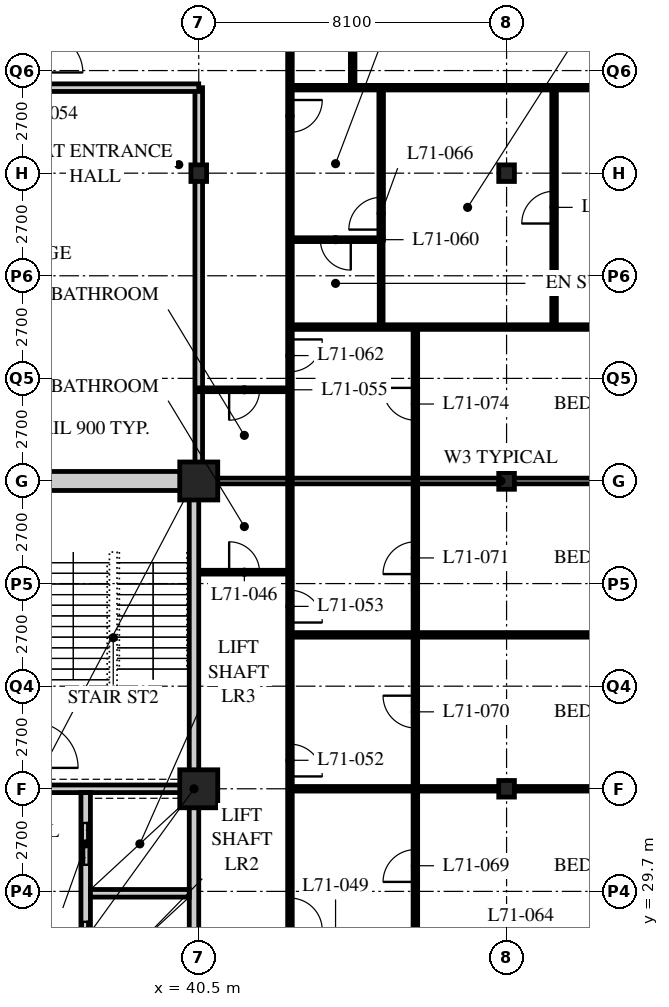
"""IFC4 building model, lengths in metres.
Left out: names, types, materials, properties, quantities, classifications, styles, units other than length and angle.
Written with IfcOpenShell. Run it as: python <this file> out.ifc"""

import sys

from ifc_helpers import new_model, si_unit, direction, frame, frame_2d, origin, origin_2d, place, context, subcontext, project, spatial, rectangle, hollow_rectangle, i_section, extrude, element, fill, save


model = new_model("IFC4")
c1 = context("Model", 3, precision=1e-05, world=origin(), true_north=direction((0.0, 1.0)))
c2 = subcontext(c1, "Body", "Model", "MODEL_VIEW")
j1 = project(units=[si_unit("LENGTHUNIT", "METRE"), si_unit("PLANEANGLEUNIT", "RADIAN")], contexts=[c1])
p1 = place(None, origin())
s1 = spatial("IfcSite", under=j1, at=p1, CompositionType="ELEMENT")
p2 = place(p1, origin())
s2 = spatial("IfcBuilding", under=s1, at=p2, CompositionType="ELEMENT")
p3 = place(p2, frame((0.0, 0.0, 277.5)))
s3 = spatial("IfcBuildingStorey", under=s2, at=p3, CompositionType="ELEMENT", Elevation=277.5)
for number, where, z_axis, x_axis in (
    (1, (40.5, 32.4, 0.0), (0.0, 0.0, 1.0), (1.0, 0.0, 0.0)),
    (2, (40.5, 40.5, 0.0), (0.0, 0.0, 1.0), (1.0, 0.0, 0.0)),
):
    element("IfcColumn", number, at=place(p3, frame(where, z_axis=z_axis, x_axis=x_axis)), inside=s3, PredefinedType="COLUMN", context=c2, shape_type="SweptSolid", body=[
        extrude(hollow_rectangle(XDim=1.0, YDim=1.0, WallThickness=0.1, at=origin_2d()), origin(), (0.0, 0.0, 1.0), 3.9),
    ])
for number, where, z_axis, x_axis in (
    (3, (40.5, 48.6, 0.0), (0.0, 0.0, 1.0), (1.0, 0.0, 0.0)),
    (4, (48.6, 32.4, 0.0), (0.0, 0.0, 1.0), (1.0, 0.0, 0.0)),
    (5, (48.6, 40.5, 0.0), (0.0, 0.0, 1.0), (1.0, 0.0, 0.0)),
    (6, (48.6, 48.6, 0.0), (0.0, 0.0, 1.0), (1.0, 0.0, 0.0)),
):
    element("IfcColumn", number, at=place(p3, frame(where, z_axis=z_axis, x_axis=x_axis)), inside=s3, PredefinedType="COLUMN", context=c2, shape_type="SweptSolid", body=[
        extrude(i_section(OverallWidth=0.412, OverallDepth=0.437, WebThickness=0.036, FlangeThickness=0.058, FilletRadius=0.015, at=origin_2d()), origin(), (0.0, 0.0, 1.0), 3.9),
    ])
p4 = place(p3, frame((40.5, 40.5, 0.0), z_axis=(0.0, 0.0, 1.0), x_axis=(0.0, 1.0, 0.0)))
e7 = element("IfcWall", 7, at=p4, inside=s3, PredefinedType="SOLIDWALL", context=c2, shape_type="SweptSolid", body=[
    extrude(rectangle(XDim=10.35, YDim=0.2, at=frame_2d((5.175, 0.0))), origin(), (0.0, 0.0, 1.0), 3.078),
])
p5 = place(p3, frame((40.5, 38.1, 0.0), z_axis=(0.0, 0.0, 1.0), x_axis=(1.0, 0.0, 0.0)))
e8 = element("IfcWall", 8, at=p5, inside=s3, PredefinedType="PARTITIONING", context=c2, shape_type="SweptSolid", body=[
    extrude(rectangle(XDim=2.4, YDim=0.1, at=frame_2d((1.2, 0.0))), origin(), (0.0, 0.0, 1.0), 3.69),
])
p6 = place(p5, frame((0.8, 0.0, 0.0)))
e9 = element("IfcOpeningElement", 9, at=p6, cuts=e8, PredefinedType="OPENING", context=c2, shape_type="SweptSolid", body=[
    extrude(rectangle(XDim=0.8, YDim=2.1, at=frame_2d((0.4, 1.05))), frame((0.0, 0.06, 0.0), z_axis=(0.0, -1.0, 0.0), x_axis=(1.0, 0.0, 0.0)), (0.0, 0.0, 1.0), 0.12),
])
p7 = place(p3, frame((42.9, 22.5, 0.0), z_axis=(0.0, 0.0, 1.0), x_axis=(0.0, 1.0, 0.0)))
e10 = element("IfcWall", 10, at=p7, inside=s3, PredefinedType="PARTITIONING", context=c2, shape_type="SweptSolid", body=[
    extrude(rectangle(XDim=18.0, YDim=0.12, at=frame_2d((9.0, 0.0))), origin(), (0.0, 0.0, 1.0), 3.69),
])
p8 = place(p7, frame((2.125, 0.0, 0.0)))
e11 = element("IfcOpeningElement", 11, at=p8, cuts=e10, PredefinedType="OPENING", context=c2, shape_type="SweptSolid", body=[
    extrude(rectangle(XDim=0.85, YDim=2.1, at=frame_2d((0.425, 1.05))), frame((0.0, 0.07, 0.0), z_axis=(0.0, -1.0, 0.0), x_axis=(1.0, 0.0, 0.0)), (0.0, 0.0, 1.0), 0.14),
])
p9 = place(p7, frame((6.175, 0.0, 0.0)))
e12 = element("IfcOpeningElement", 12, at=p9, cuts=e10, PredefinedType="OPENING", context=c2, shape_type="SweptSolid", body=[
    extrude(rectangle(XDim=0.85, YDim=2.1, at=frame_2d((0.425, 1.05))), frame((0.0, 0.07, 0.0), z_axis=(0.0, -1.0, 0.0), x_axis=(1.0, 0.0, 0.0)), (0.0, 0.0, 1.0), 0.14),
])
p10 = place(p7, frame((10.225, 0.0, 0.0)))
e13 = element("IfcOpeningElement", 13, at=p10, cuts=e10, PredefinedType="OPENING", context=c2, shape_type="SweptSolid", body=[
    extrude(rectangle(XDim=0.85, YDim=2.1, at=frame_2d((0.425, 1.05))), frame((0.0, 0.07, 0.0), z_axis=(0.0, -1.0, 0.0), x_axis=(1.0, 0.0, 0.0)), (0.0, 0.0, 1.0), 0.14),
])
p11 = place(p7, frame((14.275, 0.0, 0.0)))
e14 = element("IfcOpeningElement", 14, at=p11, cuts=e10, PredefinedType="OPENING", context=c2, shape_type="SweptSolid", body=[
    extrude(rectangle(XDim=0.85, YDim=2.1, at=frame_2d((0.425, 1.05))), frame((0.0, 0.07, 0.0), z_axis=(0.0, -1.0, 0.0), x_axis=(1.0, 0.0, 0.0)), (0.0, 0.0, 1.0), 0.14),
])
p12 = place(p3, frame((40.5, 40.5, 0.0), z_axis=(0.0, 0.0, 1.0), x_axis=(1.0, 0.0, 0.0)))
e15 = element("IfcWall", 15, at=p12, inside=s3, PredefinedType="PARTITIONING", context=c2, shape_type="SweptSolid", body=[
    extrude(rectangle(XDim=15.9, YDim=0.15, at=frame_2d((7.95, 0.0))), origin(), (0.0, 0.0, 1.0), 3.078),
])
p13 = place(p3, frame((42.9, 32.4, 0.0), z_axis=(0.0, 0.0, 1.0), x_axis=(1.0, 0.0, 0.0)))
e16 = element("IfcWall", 16, at=p13, inside=s3, PredefinedType="PARTITIONING", context=c2, shape_type="SweptSolid", body=[
    extrude(rectangle(XDim=13.5, YDim=0.12, at=frame_2d((6.75, 0.0))), origin(), (0.0, 0.0, 1.0), 3.078),
])
p14 = place(p3, frame((42.9, 36.45, 0.0), z_axis=(0.0, 0.0, 1.0), x_axis=(1.0, 0.0, 0.0)))
e17 = element("IfcWall", 17, at=p14, inside=s3, PredefinedType="PARTITIONING", context=c2, shape_type="SweptSolid", body=[
    extrude(rectangle(XDim=13.5, YDim=0.12, at=frame_2d((6.75, 0.0))), origin(), (0.0, 0.0, 1.0), 3.69),
])
p15 = place(p3, frame((40.5, 42.9, 0.0), z_axis=(0.0, 0.0, 1.0), x_axis=(1.0, 0.0, 0.0)))
e18 = element("IfcWall", 18, at=p15, inside=s3, PredefinedType="PARTITIONING", context=c2, shape_type="SweptSolid", body=[
    extrude(rectangle(XDim=2.4, YDim=0.1, at=frame_2d((1.2, 0.0))), origin(), (0.0, 0.0, 1.0), 3.69),
])
p16 = place(p15, frame((0.8, 0.0, 0.0)))
e19 = element("IfcOpeningElement", 19, at=p16, cuts=e18, PredefinedType="OPENING", context=c2, shape_type="SweptSolid", body=[
    extrude(rectangle(XDim=0.8, YDim=2.1, at=frame_2d((0.4, 1.05))), frame((0.0, 0.06, 0.0), z_axis=(0.0, -1.0, 0.0), x_axis=(1.0, 0.0, 0.0)), (0.0, 0.0, 1.0), 0.12),
])
p17 = place(p3, frame((42.9, 52.65, 0.0), z_axis=(0.0, 0.0, 1.0), x_axis=(0.0, -1.0, 0.0)))
e20 = element("IfcWall", 20, at=p17, inside=s3, PredefinedType="PARTITIONING", context=c2, shape_type="SweptSolid", body=[
    extrude(rectangle(XDim=12.15, YDim=0.12, at=frame_2d((6.075, 0.0))), origin(), (0.0, 0.0, 1.0), 3.69),
])
p18 = place(p17, frame((2.125, 0.0, 0.0)))
e21 = element("IfcOpeningElement", 21, at=p18, cuts=e20, PredefinedType="OPENING", context=c2, shape_type="SweptSolid", body=[
    extrude(rectangle(XDim=0.85, YDim=2.1, at=frame_2d((0.425, 1.05))), frame((0.0, 0.07, 0.0), z_axis=(0.0, -1.0, 0.0), x_axis=(1.0, 0.0, 0.0)), (0.0, 0.0, 1.0), 0.14),
])
p19 = place(p17, frame((8.425, 0.0, 0.0)))
e22 = element("IfcOpeningElement", 22, at=p19, cuts=e20, PredefinedType="OPENING", context=c2, shape_type="SweptSolid", body=[
    extrude(rectangle(XDim=0.85, YDim=2.1, at=frame_2d((0.425, 1.05))), frame((0.0, 0.07, 0.0), z_axis=(0.0, -1.0, 0.0), x_axis=(1.0, 0.0, 0.0)), (0.0, 0.0, 1.0), 0.14),
])
p20 = place(p3, frame((36.45, 50.85, 0.0), z_axis=(0.0, 0.0, 1.0), x_axis=(1.0, 0.0, 0.0)))
e23 = element("IfcWall", 23, at=p20, inside=s3, PredefinedType="SOLIDWALL", context=c2, shape_type="SweptSolid", body=[
    extrude(rectangle(XDim=4.05, YDim=0.2, at=frame_2d((2.025, 0.0))), origin(), (0.0, 0.0, 1.0), 3.69),
])
p21 = place(p3, frame((42.9, 50.85, 0.0), z_axis=(0.0, 0.0, 1.0), x_axis=(1.0, 0.0, 0.0)))
e24 = element("IfcWall", 24, at=p21, inside=s3, PredefinedType="PARTITIONING", context=c2, shape_type="SweptSolid", body=[
    extrude(rectangle(XDim=13.5, YDim=0.12, at=frame_2d((6.75, 0.0))), origin(), (0.0, 0.0, 1.0), 3.69),
])
p22 = place(p3, frame((44.55, 64.5, 0.0), z_axis=(0.0, 0.0, 1.0), x_axis=(0.0, -1.0, 0.0)))
e25 = element("IfcWall", 25, at=p22, inside=s3, PredefinedType="PARTITIONING", context=c2, shape_type="SweptSolid", body=[
    extrude(rectangle(XDim=13.65, YDim=0.12, at=frame_2d((6.825, 0.0))), origin(), (0.0, 0.0, 1.0), 3.69),
])
p23 = place(p22, frame((8.425, 0.0, 0.0)))
e26 = element("IfcOpeningElement", 26, at=p23, cuts=e25, PredefinedType="OPENING", context=c2, shape_type="SweptSolid", body=[
    extrude(rectangle(XDim=0.85, YDim=2.1, at=frame_2d((0.425, 1.05))), frame((0.0, 0.07, 0.0), z_axis=(0.0, -1.0, 0.0), x_axis=(1.0, 0.0, 0.0)), (0.0, 0.0, 1.0), 0.14),
])
p24 = place(p22, frame((2.5, 0.0, 0.0)))
e27 = element("IfcOpeningElement", 27, at=p24, cuts=e25, PredefinedType="OPENING", context=c2, shape_type="SweptSolid", body=[
    extrude(rectangle(XDim=0.85, YDim=2.1, at=frame_2d((0.425, 1.05))), frame((0.0, 0.07, 0.0), z_axis=(0.0, -1.0, 0.0), x_axis=(1.0, 0.0, 0.0)), (0.0, 0.0, 1.0), 0.14),
])
p25 = place(p3, frame((42.9, 46.85, 0.0), z_axis=(0.0, 0.0, 1.0), x_axis=(1.0, 0.0, 0.0)))
e28 = element("IfcWall", 28, at=p25, inside=s3, PredefinedType="PARTITIONING", context=c2, shape_type="SweptSolid", body=[
    extrude(rectangle(XDim=2.4, YDim=0.1, at=frame_2d((1.2, 0.0))), origin(), (0.0, 0.0, 1.0), 3.69),
])
p26 = place(p25, frame((0.8, 0.0, 0.0)))
e29 = element("IfcOpeningElement", 29, at=p26, cuts=e28, PredefinedType="OPENING", context=c2, shape_type="SweptSolid", body=[
    extrude(rectangle(XDim=0.8, YDim=2.1, at=frame_2d((0.4, 1.05))), frame((0.0, 0.06, 0.0), z_axis=(0.0, -1.0, 0.0), x_axis=(1.0, 0.0, 0.0)), (0.0, 0.0, 1.0), 0.12),
])
p27 = place(p3, frame((45.3, 46.85, 0.0), z_axis=(0.0, 0.0, 1.0), x_axis=(0.0, -1.0, 0.0)))
e30 = element("IfcWall", 30, at=p27, inside=s3, PredefinedType="PARTITIONING", context=c2, shape_type="SweptSolid", body=[
    extrude(rectangle(XDim=2.3, YDim=0.1, at=frame_2d((1.15, 0.0))), origin(), (0.0, 0.0, 1.0), 3.69),
])
p28 = place(p3, frame((42.9, 44.55, 0.0), z_axis=(0.0, 0.0, 1.0), x_axis=(1.0, 0.0, 0.0)))
e31 = element("IfcWall", 31, at=p28, inside=s3, PredefinedType="PARTITIONING", context=c2, shape_type="SweptSolid", body=[
    extrude(rectangle(XDim=13.5, YDim=0.12, at=frame_2d((6.75, 0.0))), origin(), (0.0, 0.0, 1.0), 3.69),
])
p29 = place(p3, frame((45.3, 50.85, 0.0), z_axis=(0.0, 0.0, 1.0), x_axis=(0.0, -1.0, 0.0)))
e32 = element("IfcWall", 32, at=p29, inside=s3, PredefinedType="PARTITIONING", context=c2, shape_type="SweptSolid", body=[
    extrude(rectangle(XDim=4.01, YDim=0.12, at=frame_2d((2.005, 0.0))), origin(), (0.0, 0.0, 1.0), 3.69),
])
p30 = place(p29, frame((2.885, 0.0, 0.0)))
e33 = element("IfcOpeningElement", 33, at=p30, cuts=e32, PredefinedType="OPENING", context=c2, shape_type="SweptSolid", body=[
    extrude(rectangle(XDim=0.85, YDim=2.1, at=frame_2d((0.425, 1.05))), frame((0.0, 0.07, 0.0), z_axis=(0.0, -1.0, 0.0), x_axis=(1.0, 0.0, 0.0)), (0.0, 0.0, 1.0), 0.14),
])
p31 = place(p3, frame((46.2, 28.35, 0.0), z_axis=(0.0, 0.0, 1.0), x_axis=(0.0, 1.0, 0.0)))
e34 = element("IfcWall", 34, at=p31, inside=s3, PredefinedType="PARTITIONING", context=c2, shape_type="SweptSolid", body=[
    extrude(rectangle(XDim=16.2, YDim=0.12, at=frame_2d((8.1, 0.0))), origin(), (0.0, 0.0, 1.0), 3.69),
])
p32 = place(p31, frame((1.6, 0.0, 0.0)))
e35 = element("IfcOpeningElement", 35, at=p32, cuts=e34, PredefinedType="OPENING", context=c2, shape_type="SweptSolid", body=[
    extrude(rectangle(XDim=0.85, YDim=2.1, at=frame_2d((0.425, 1.05))), frame((0.0, 0.07, 0.0), z_axis=(0.0, -1.0, 0.0), x_axis=(1.0, 0.0, 0.0)), (0.0, 0.0, 1.0), 0.14),
])
p33 = place(p31, frame((5.65, 0.0, 0.0)))
e36 = element("IfcOpeningElement", 36, at=p33, cuts=e34, PredefinedType="OPENING", context=c2, shape_type="SweptSolid", body=[
    extrude(rectangle(XDim=0.85, YDim=2.1, at=frame_2d((0.425, 1.05))), frame((0.0, 0.07, 0.0), z_axis=(0.0, -1.0, 0.0), x_axis=(1.0, 0.0, 0.0)), (0.0, 0.0, 1.0), 0.14),
])
p34 = place(p31, frame((9.7, 0.0, 0.0)))
e37 = element("IfcOpeningElement", 37, at=p34, cuts=e34, PredefinedType="OPENING", context=c2, shape_type="SweptSolid", body=[
    extrude(rectangle(XDim=0.85, YDim=2.1, at=frame_2d((0.425, 1.05))), frame((0.0, 0.07, 0.0), z_axis=(0.0, -1.0, 0.0), x_axis=(1.0, 0.0, 0.0)), (0.0, 0.0, 1.0), 0.14),
])
p35 = place(p31, frame((13.75, 0.0, 0.0)))
e38 = element("IfcOpeningElement", 38, at=p35, cuts=e34, PredefinedType="OPENING", context=c2, shape_type="SweptSolid", body=[
    extrude(rectangle(XDim=0.85, YDim=2.1, at=frame_2d((0.425, 1.05))), frame((0.0, 0.07, 0.0), z_axis=(0.0, -1.0, 0.0), x_axis=(1.0, 0.0, 0.0)), (0.0, 0.0, 1.0), 0.14),
])
p36 = place(p3, frame((49.85, 44.55, 0.0), z_axis=(0.0, 0.0, 1.0), x_axis=(0.0, 1.0, 0.0)))
e39 = element("IfcWall", 39, at=p36, inside=s3, PredefinedType="PARTITIONING", context=c2, shape_type="SweptSolid", body=[
    extrude(rectangle(XDim=6.3, YDim=0.12, at=frame_2d((3.15, 0.0))), origin(), (0.0, 0.0, 1.0), 3.69),
])
p37 = place(p36, frame((2.725, 0.0, 0.0)))
e40 = element("IfcOpeningElement", 40, at=p37, cuts=e39, PredefinedType="OPENING", context=c2, shape_type="SweptSolid", body=[
    extrude(rectangle(XDim=0.85, YDim=2.1, at=frame_2d((0.425, 1.05))), frame((0.0, 0.07, 0.0), z_axis=(0.0, -1.0, 0.0), x_axis=(1.0, 0.0, 0.0)), (0.0, 0.0, 1.0), 0.14),
])
p38 = place(p3, frame((15.95, 40.5, 0.0), z_axis=(0.0, 0.0, 1.0), x_axis=(1.0, 0.0, 0.0)))
e41 = element("IfcWall", 41, at=p38, inside=s3, PredefinedType="SOLIDWALL", context=c2, shape_type="SweptSolid", body=[
    extrude(rectangle(XDim=24.55, YDim=0.5, at=frame_2d((12.275, 0.0))), origin(), (0.0, 0.0, 1.0), 3.04),
])
p39 = place(p38, frame((11.5, 0.0, 0.0)))
e42 = element("IfcOpeningElement", 42, at=p39, cuts=e41, PredefinedType="OPENING", context=c2, shape_type="SweptSolid", body=[
    extrude(rectangle(XDim=1.8, YDim=2.4, at=frame_2d((0.9, 1.2))), frame((0.0, 0.26, 0.0), z_axis=(0.0, -1.0, 0.0), x_axis=(1.0, 0.0, 0.0)), (0.0, 0.0, 1.0), 0.52),
])
p40 = place(p3, frame((40.375, 24.55, 0.0), z_axis=(0.0, 0.0, 1.0), x_axis=(0.0, 1.0, 0.0)))
e43 = element("IfcWall", 43, at=p40, inside=s3, PredefinedType="SOLIDWALL", context=c2, shape_type="SweptSolid", body=[
    extrude(rectangle(XDim=15.7, YDim=0.25, at=frame_2d((7.85, 0.0))), origin(), (0.0, 0.0, 1.0), 3.078),
])
p41 = place(p3, frame((32.3, 32.4, 0.0), z_axis=(0.0, 0.0, 1.0), x_axis=(1.0, 0.0, 0.0)))
e44 = element("IfcWall", 44, at=p41, inside=s3, PredefinedType="SOLIDWALL", context=c2, shape_type="SweptSolid", body=[
    extrude(rectangle(XDim=7.95, YDim=0.2, at=frame_2d((3.975, 0.0))), origin(), (0.0, 0.0, 1.0), 3.078),
])
p42 = place(p3, frame((37.525, 24.55, 0.0), z_axis=(0.0, 0.0, 1.0), x_axis=(0.0, 1.0, 0.0)))
e45 = element("IfcWall", 45, at=p42, inside=s3, PredefinedType="SOLIDWALL", context=c2, shape_type="SweptSolid", body=[
    extrude(rectangle(XDim=7.75, YDim=0.25, at=frame_2d((3.875, 0.0))), origin(), (0.0, 0.0, 1.0), 3.69),
])
p43 = place(p42, frame((0.65, 0.0, 0.0)))
e46 = element("IfcOpeningElement", 46, at=p43, cuts=e45, PredefinedType="OPENING", context=c2, shape_type="SweptSolid", body=[
    extrude(rectangle(XDim=1.1, YDim=2.4, at=frame_2d((0.55, 1.2))), frame((0.0, 0.135, 0.0), z_axis=(0.0, -1.0, 0.0), x_axis=(1.0, 0.0, 0.0)), (0.0, 0.0, 1.0), 0.27),
])
p44 = place(p42, frame((3.25, 0.0, 0.0)))
e47 = element("IfcOpeningElement", 47, at=p44, cuts=e45, PredefinedType="OPENING", context=c2, shape_type="SweptSolid", body=[
    extrude(rectangle(XDim=1.1, YDim=2.4, at=frame_2d((0.55, 1.2))), frame((0.0, 0.135, 0.0), z_axis=(0.0, -1.0, 0.0), x_axis=(1.0, 0.0, 0.0)), (0.0, 0.0, 1.0), 0.27),
])
p45 = place(p42, frame((5.85, 0.0, 0.0)))
e48 = element("IfcOpeningElement", 48, at=p45, cuts=e45, PredefinedType="OPENING", context=c2, shape_type="SweptSolid", body=[
    extrude(rectangle(XDim=1.1, YDim=2.4, at=frame_2d((0.55, 1.2))), frame((0.0, 0.135, 0.0), z_axis=(0.0, -1.0, 0.0), x_axis=(1.0, 0.0, 0.0)), (0.0, 0.0, 1.0), 0.27),
])
p46 = place(p3, frame((37.65, 29.65, 0.0), z_axis=(0.0, 0.0, 1.0), x_axis=(1.0, 0.0, 0.0)))
e49 = element("IfcWall", 49, at=p46, inside=s3, PredefinedType="SOLIDWALL", context=c2, shape_type="SweptSolid", body=[
    extrude(rectangle(XDim=2.6, YDim=0.2, at=frame_2d((1.3, 0.0))), origin(), (0.0, 0.0, 1.0), 3.69),
])
p47 = place(p6, origin())
e50 = element("IfcDoor", 50, at=p47, inside=s3, OperationType="SINGLE_SWING_LEFT", PredefinedType="DOOR", context=c2, shape_type="SweptSolid", body=[
    extrude(rectangle(XDim=0.8, YDim=2.1, at=frame_2d((0.4, 1.05))), frame((0.0, 0.025, 0.0), z_axis=(0.0, -1.0, 0.0), x_axis=(1.0, 0.0, 0.0)), (0.0, 0.0, 1.0), 0.05),
])
fill(e9, e50)
p48 = place(p9, origin())
e51 = element("IfcDoor", 51, at=p48, inside=s3, OperationType="SINGLE_SWING_RIGHT", PredefinedType="DOOR", context=c2, shape_type="SweptSolid", body=[
    extrude(rectangle(XDim=0.85, YDim=2.1, at=frame_2d((0.425, 1.05))), frame((0.0, 0.025, 0.0), z_axis=(0.0, -1.0, 0.0), x_axis=(1.0, 0.0, 0.0)), (0.0, 0.0, 1.0), 0.05),
])
fill(e12, e51)
p49 = place(p10, origin())
e52 = element("IfcDoor", 52, at=p49, inside=s3, OperationType="SINGLE_SWING_RIGHT", PredefinedType="DOOR", context=c2, shape_type="SweptSolid", body=[
    extrude(rectangle(XDim=0.85, YDim=2.1, at=frame_2d((0.425, 1.05))), frame((0.0, 0.025, 0.0), z_axis=(0.0, -1.0, 0.0), x_axis=(1.0, 0.0, 0.0)), (0.0, 0.0, 1.0), 0.05),
])
fill(e13, e52)
p50 = place(p11, origin())
e53 = element("IfcDoor", 53, at=p50, inside=s3, OperationType="SINGLE_SWING_RIGHT", PredefinedType="DOOR", context=c2, shape_type="SweptSolid", body=[
    extrude(rectangle(XDim=0.85, YDim=2.1, at=frame_2d((0.425, 1.05))), frame((0.0, 0.025, 0.0), z_axis=(0.0, -1.0, 0.0), x_axis=(1.0, 0.0, 0.0)), (0.0, 0.0, 1.0), 0.05),
])
fill(e14, e53)
p51 = place(p16, origin())
e54 = element("IfcDoor", 54, at=p51, inside=s3, OperationType="SINGLE_SWING_RIGHT", PredefinedType="DOOR", context=c2, shape_type="SweptSolid", body=[
    extrude(rectangle(XDim=0.8, YDim=2.1, at=frame_2d((0.4, 1.05))), frame((0.0, 0.025, 0.0), z_axis=(0.0, -1.0, 0.0), x_axis=(1.0, 0.0, 0.0)), (0.0, 0.0, 1.0), 0.05),
])
fill(e19, e54)
p52 = place(p26, origin())
e55 = element("IfcDoor", 55, at=p52, inside=s3, OperationType="SINGLE_SWING_LEFT", PredefinedType="DOOR", context=c2, shape_type="SweptSolid", body=[
    extrude(rectangle(XDim=0.8, YDim=2.1, at=frame_2d((0.4, 1.05))), frame((0.0, 0.025, 0.0), z_axis=(0.0, -1.0, 0.0), x_axis=(1.0, 0.0, 0.0)), (0.0, 0.0, 1.0), 0.05),
])
fill(e29, e55)
p53 = place(p18, origin())
e56 = element("IfcDoor", 56, at=p53, inside=s3, OperationType="SINGLE_SWING_LEFT", PredefinedType="DOOR", context=c2, shape_type="SweptSolid", body=[
    extrude(rectangle(XDim=0.85, YDim=2.1, at=frame_2d((0.425, 1.05))), frame((0.0, 0.025, 0.0), z_axis=(0.0, -1.0, 0.0), x_axis=(1.0, 0.0, 0.0)), (0.0, 0.0, 1.0), 0.05),
])
fill(e21, e56)
p54 = place(p19, origin())
e57 = element("IfcDoor", 57, at=p54, inside=s3, OperationType="SINGLE_SWING_LEFT", PredefinedType="DOOR", context=c2, shape_type="SweptSolid", body=[
    extrude(rectangle(XDim=0.85, YDim=2.1, at=frame_2d((0.425, 1.05))), frame((0.0, 0.025, 0.0), z_axis=(0.0, -1.0, 0.0), x_axis=(1.0, 0.0, 0.0)), (0.0, 0.0, 1.0), 0.05),
])
fill(e22, e57)
p55 = place(p30, origin())
e58 = element("IfcDoor", 58, at=p55, inside=s3, OperationType="SINGLE_SWING_LEFT", PredefinedType="DOOR", context=c2, shape_type="SweptSolid", body=[
    extrude(rectangle(XDim=0.85, YDim=2.1, at=frame_2d((0.425, 1.05))), frame((0.0, 0.025, 0.0), z_axis=(0.0, -1.0, 0.0), x_axis=(1.0, 0.0, 0.0)), (0.0, 0.0, 1.0), 0.05),
])
fill(e33, e58)
p56 = place(p32, origin())
e59 = element("IfcDoor", 59, at=p56, inside=s3, OperationType="SINGLE_SWING_LEFT", PredefinedType="DOOR", context=c2, shape_type="SweptSolid", body=[
    extrude(rectangle(XDim=0.85, YDim=2.1, at=frame_2d((0.425, 1.05))), frame((0.0, 0.025, 0.0), z_axis=(0.0, -1.0, 0.0), x_axis=(1.0, 0.0, 0.0)), (0.0, 0.0, 1.0), 0.05),
])
fill(e35, e59)
p57 = place(p33, origin())
e60 = element("IfcDoor", 60, at=p57, inside=s3, OperationType="SINGLE_SWING_RIGHT", PredefinedType="DOOR", context=c2, shape_type="SweptSolid", body=[
    extrude(rectangle(XDim=0.85, YDim=2.1, at=frame_2d((0.425, 1.05))), frame((0.0, 0.025, 0.0), z_axis=(0.0, -1.0, 0.0), x_axis=(1.0, 0.0, 0.0)), (0.0, 0.0, 1.0), 0.05),
])
fill(e36, e60)
p58 = place(p34, origin())
e61 = element("IfcDoor", 61, at=p58, inside=s3, OperationType="SINGLE_SWING_LEFT", PredefinedType="DOOR", context=c2, shape_type="SweptSolid", body=[
    extrude(rectangle(XDim=0.85, YDim=2.1, at=frame_2d((0.425, 1.05))), frame((0.0, 0.025, 0.0), z_axis=(0.0, -1.0, 0.0), x_axis=(1.0, 0.0, 0.0)), (0.0, 0.0, 1.0), 0.05),
])
fill(e37, e61)
p59 = place(p37, origin())
e62 = element("IfcDoor", 62, at=p59, inside=s3, OperationType="SINGLE_SWING_LEFT", PredefinedType="DOOR", context=c2, shape_type="SweptSolid", body=[
    extrude(rectangle(XDim=0.85, YDim=2.1, at=frame_2d((0.425, 1.05))), frame((0.0, 0.025, 0.0), z_axis=(0.0, -1.0, 0.0), x_axis=(1.0, 0.0, 0.0)), (0.0, 0.0, 1.0), 0.05),
])
fill(e40, e62)
p60 = place(p35, origin())
e63 = element("IfcDoor", 63, at=p60, inside=s3, OperationType="SINGLE_SWING_RIGHT", PredefinedType="DOOR", context=c2, shape_type="SweptSolid", body=[
    extrude(rectangle(XDim=0.85, YDim=2.1, at=frame_2d((0.425, 1.05))), frame((0.0, 0.025, 0.0), z_axis=(0.0, -1.0, 0.0), x_axis=(1.0, 0.0, 0.0)), (0.0, 0.0, 1.0), 0.05),
])
fill(e38, e63)
p61 = place(p44, origin())
e64 = element("IfcDoor", 64, at=p61, inside=s3, OperationType="DOUBLE_DOOR_SLIDING", PredefinedType="DOOR", context=c2, shape_type="SweptSolid", body=[
    extrude(rectangle(XDim=1.1, YDim=2.4, at=frame_2d((0.55, 1.2))), frame((0.0, 0.025, 0.0), z_axis=(0.0, -1.0, 0.0), x_axis=(1.0, 0.0, 0.0)), (0.0, 0.0, 1.0), 0.05),
])
fill(e47, e64)
p62 = place(p45, origin())
e65 = element("IfcDoor", 65, at=p62, inside=s3, OperationType="DOUBLE_DOOR_SLIDING", PredefinedType="DOOR", context=c2, shape_type="SweptSolid", body=[
    extrude(rectangle(XDim=1.1, YDim=2.4, at=frame_2d((0.55, 1.2))), frame((0.0, 0.025, 0.0), z_axis=(0.0, -1.0, 0.0), x_axis=(1.0, 0.0, 0.0)), (0.0, 0.0, 1.0), 0.05),
])
fill(e48, e65)
save(model, sys.argv[1])
